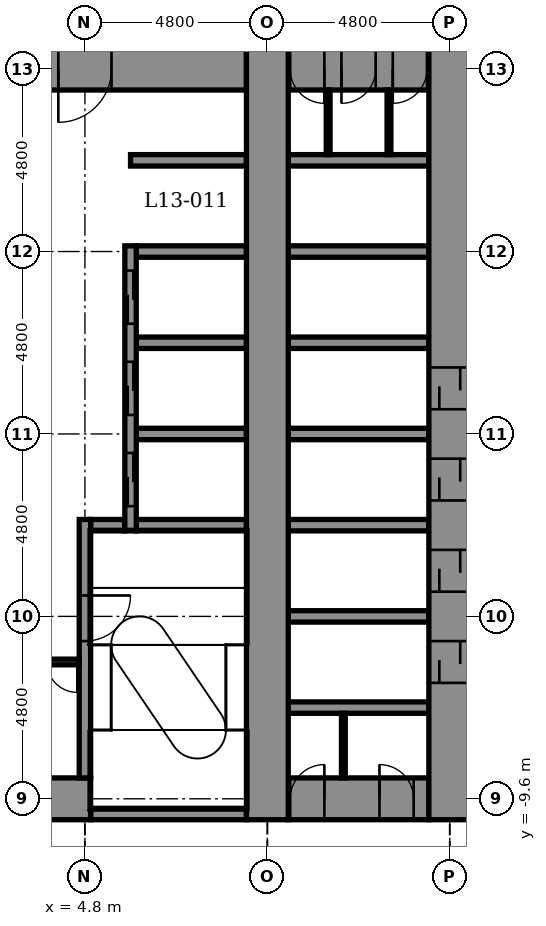
"""IFC4 building model, lengths in metres.
Left out: names, types, materials, properties, quantities, classifications, styles, units other than length and angle.
Written with IfcOpenShell. Run it as: python <this file> out.ifc"""

import sys

from ifc_helpers import new_model, si_unit, direction, frame, frame_2d, origin, place, context, subcontext, project, spatial, rectangle, extrude, element, fill, save


model = new_model("IFC4")
c1 = context("Model", 3, precision=1e-05, world=origin(), true_north=direction((0.0, 1.0)))
c2 = subcontext(c1, "Body", "Model", "MODEL_VIEW")
j1 = project(units=[si_unit("LENGTHUNIT", "METRE"), si_unit("PLANEANGLEUNIT", "RADIAN")], contexts=[c1])
p1 = place(None, origin())
s1 = spatial("IfcSite", under=j1, at=p1, CompositionType="ELEMENT")
p2 = place(p1, origin())
s2 = spatial("IfcBuilding", under=s1, at=p2, CompositionType="ELEMENT")
p3 = place(p2, frame((0.0, 0.0, 71.9)))
s3 = spatial("IfcBuildingStorey", under=s2, at=p3, CompositionType="ELEMENT", Elevation=71.9)
p4 = place(p3, frame((4.95, -10.0, -0.3), z_axis=(0.0, 0.0, 1.0), x_axis=(1.0, 0.0, 0.0)))
e1 = element("IfcWall", 1, at=p4, inside=s3, PredefinedType="STANDARD", context=c2, shape_type="SweptSolid", body=[
    extrude(rectangle(XDim=4.1, YDim=0.3, at=frame_2d((2.05, 0.0))), origin(), (0.0, 0.0, 1.0), 6.1),
])
p5 = place(p3, frame((-5.25, -9.6, -0.3), z_axis=(0.0, 0.0, 1.0), x_axis=(1.0, 0.0, 0.0)))
e2 = element("IfcWall", 2, at=p5, inside=s3, PredefinedType="SHEAR", context=c2, shape_type="SweptSolid", body=[
    extrude(rectangle(XDim=10.2, YDim=1.1, at=frame_2d((5.1, 0.0))), origin(), (0.0, 0.0, 1.0), 6.1),
])
p6 = place(p5, frame((0.6, 0.0, 0.3)))
e3 = element("IfcOpeningElement", 3, at=p6, cuts=e2, PredefinedType="OPENING", context=c2, shape_type="SweptSolid", body=[
    extrude(rectangle(XDim=0.9, YDim=2.1, at=frame_2d((0.45, 1.05))), frame((0.0, 0.56, 0.0), z_axis=(0.0, -1.0, 0.0), x_axis=(1.0, 0.0, 0.0)), (0.0, 0.0, 1.0), 1.12),
])
p7 = place(p3, frame((10.15, -9.6, -0.3), z_axis=(0.0, 0.0, 1.0), x_axis=(1.0, 0.0, 0.0)))
e4 = element("IfcWall", 4, at=p7, inside=s3, PredefinedType="SHEAR", context=c2, shape_type="SweptSolid", body=[
    extrude(rectangle(XDim=3.7, YDim=1.1, at=frame_2d((1.85, 0.0))), origin(), (0.0, 0.0, 1.0), 6.1),
])
p8 = place(p7, frame((0.05, 0.0, 0.3)))
e5 = element("IfcOpeningElement", 5, at=p8, cuts=e4, PredefinedType="OPENING", context=c2, shape_type="SweptSolid", body=[
    extrude(rectangle(XDim=0.9, YDim=2.1, at=frame_2d((0.45, 1.05))), frame((0.0, 0.56, 0.0), z_axis=(0.0, -1.0, 0.0), x_axis=(1.0, 0.0, 0.0)), (0.0, 0.0, 1.0), 1.12),
])
p9 = place(p7, frame((2.4, 0.0, 0.3)))
e6 = element("IfcOpeningElement", 6, at=p9, cuts=e4, PredefinedType="OPENING", context=c2, shape_type="SweptSolid", body=[
    extrude(rectangle(XDim=0.9, YDim=2.1, at=frame_2d((0.45, 1.05))), frame((0.0, 0.56, 0.0), z_axis=(0.0, -1.0, 0.0), x_axis=(1.0, 0.0, 0.0)), (0.0, 0.0, 1.0), 1.12),
])
for number, where, z_axis, x_axis in (
    (7, (10.15, -7.2, -0.3), (0.0, 0.0, 1.0), (1.0, 0.0, 0.0)),
    (8, (10.15, -4.8, -0.3), (0.0, 0.0, 1.0), (1.0, 0.0, 0.0)),
):
    element("IfcWall", number, at=place(p3, frame(where, z_axis=z_axis, x_axis=x_axis)), inside=s3, PredefinedType="STANDARD", context=c2, shape_type="SweptSolid", body=[
        extrude(rectangle(XDim=3.7, YDim=0.3, at=frame_2d((1.85, 0.0))), origin(), (0.0, 0.0, 1.0), 6.1),
    ])
p10 = place(p3, frame((4.95, -2.4, -0.3), z_axis=(0.0, 0.0, 1.0), x_axis=(1.0, 0.0, 0.0)))
e9 = element("IfcWall", 9, at=p10, inside=s3, PredefinedType="STANDARD", context=c2, shape_type="SweptSolid", body=[
    extrude(rectangle(XDim=0.9, YDim=0.3, at=frame_2d((0.45, 0.0))), origin(), (0.0, 0.0, 1.0), 6.1),
])
p11 = place(p3, frame((6.15, -2.4, -0.3), z_axis=(0.0, 0.0, 1.0), x_axis=(1.0, 0.0, 0.0)))
e10 = element("IfcWall", 10, at=p11, inside=s3, PredefinedType="STANDARD", context=c2, shape_type="SweptSolid", body=[
    extrude(rectangle(XDim=2.9, YDim=0.3, at=frame_2d((1.45, 0.0))), origin(), (0.0, 0.0, 1.0), 6.1),
])
p12 = place(p3, frame((10.15, -2.4, -0.3), z_axis=(0.0, 0.0, 1.0), x_axis=(1.0, 0.0, 0.0)))
e11 = element("IfcWall", 11, at=p12, inside=s3, PredefinedType="STANDARD", context=c2, shape_type="SweptSolid", body=[
    extrude(rectangle(XDim=3.7, YDim=0.3, at=frame_2d((1.85, 0.0))), origin(), (0.0, 0.0, 1.0), 6.1),
])
p13 = place(p3, frame((6.15, 0.0, -0.3), z_axis=(0.0, 0.0, 1.0), x_axis=(1.0, 0.0, 0.0)))
e12 = element("IfcWall", 12, at=p13, inside=s3, PredefinedType="STANDARD", context=c2, shape_type="SweptSolid", body=[
    extrude(rectangle(XDim=2.9, YDim=0.3, at=frame_2d((1.45, 0.0))), origin(), (0.0, 0.0, 1.0), 6.1),
])
p14 = place(p3, frame((10.15, 0.0, -0.3), z_axis=(0.0, 0.0, 1.0), x_axis=(1.0, 0.0, 0.0)))
e13 = element("IfcWall", 13, at=p14, inside=s3, PredefinedType="STANDARD", context=c2, shape_type="SweptSolid", body=[
    extrude(rectangle(XDim=3.7, YDim=0.3, at=frame_2d((1.85, 0.0))), origin(), (0.0, 0.0, 1.0), 6.1),
])
p15 = place(p3, frame((6.15, 2.4, -0.3), z_axis=(0.0, 0.0, 1.0), x_axis=(1.0, 0.0, 0.0)))
e14 = element("IfcWall", 14, at=p15, inside=s3, PredefinedType="STANDARD", context=c2, shape_type="SweptSolid", body=[
    extrude(rectangle(XDim=2.9, YDim=0.3, at=frame_2d((1.45, 0.0))), origin(), (0.0, 0.0, 1.0), 6.1),
])
p16 = place(p3, frame((10.15, 2.4, -0.3), z_axis=(0.0, 0.0, 1.0), x_axis=(1.0, 0.0, 0.0)))
e15 = element("IfcWall", 15, at=p16, inside=s3, PredefinedType="STANDARD", context=c2, shape_type="SweptSolid", body=[
    extrude(rectangle(XDim=3.7, YDim=0.3, at=frame_2d((1.85, 0.0))), origin(), (0.0, 0.0, 1.0), 6.1),
])
p17 = place(p3, frame((6.15, 4.8, -0.3), z_axis=(0.0, 0.0, 1.0), x_axis=(1.0, 0.0, 0.0)))
e16 = element("IfcWall", 16, at=p17, inside=s3, PredefinedType="STANDARD", context=c2, shape_type="SweptSolid", body=[
    extrude(rectangle(XDim=2.9, YDim=0.3, at=frame_2d((1.45, 0.0))), origin(), (0.0, 0.0, 1.0), 6.1),
])
p18 = place(p3, frame((10.15, 4.8, -0.3), z_axis=(0.0, 0.0, 1.0), x_axis=(1.0, 0.0, 0.0)))
e17 = element("IfcWall", 17, at=p18, inside=s3, PredefinedType="STANDARD", context=c2, shape_type="SweptSolid", body=[
    extrude(rectangle(XDim=3.7, YDim=0.3, at=frame_2d((1.85, 0.0))), origin(), (0.0, 0.0, 1.0), 6.1),
])
p19 = place(p3, frame((6.0, 7.2, -0.3), z_axis=(0.0, 0.0, 1.0), x_axis=(1.0, 0.0, 0.0)))
e18 = element("IfcWall", 18, at=p19, inside=s3, PredefinedType="STANDARD", context=c2, shape_type="SweptSolid", body=[
    extrude(rectangle(XDim=3.05, YDim=0.3, at=frame_2d((1.525, 0.0))), origin(), (0.0, 0.0, 1.0), 6.1),
])
p20 = place(p3, frame((10.15, 7.2, -0.3), z_axis=(0.0, 0.0, 1.0), x_axis=(1.0, 0.0, 0.0)))
e19 = element("IfcWall", 19, at=p20, inside=s3, PredefinedType="STANDARD", context=c2, shape_type="SweptSolid", body=[
    extrude(rectangle(XDim=3.7, YDim=0.3, at=frame_2d((1.85, 0.0))), origin(), (0.0, 0.0, 1.0), 6.1),
])
p21 = place(p3, frame((-5.25, 9.6, -0.3), z_axis=(0.0, 0.0, 1.0), x_axis=(1.0, 0.0, 0.0)))
e20 = element("IfcWall", 20, at=p21, inside=s3, PredefinedType="SHEAR", context=c2, shape_type="SweptSolid", body=[
    extrude(rectangle(XDim=14.3, YDim=1.1, at=frame_2d((7.15, 0.0))), origin(), (0.0, 0.0, 1.0), 6.1),
])
p22 = place(p21, frame((9.35, 0.0, 0.3)))
e21 = element("IfcOpeningElement", 21, at=p22, cuts=e20, PredefinedType="OPENING", context=c2, shape_type="SweptSolid", body=[
    extrude(rectangle(XDim=1.4, YDim=2.1, at=frame_2d((0.7, 1.05))), frame((0.0, 0.56, 0.0), z_axis=(0.0, -1.0, 0.0), x_axis=(1.0, 0.0, 0.0)), (0.0, 0.0, 1.0), 1.12),
])
p23 = place(p3, frame((10.15, 9.6, -0.3), z_axis=(0.0, 0.0, 1.0), x_axis=(1.0, 0.0, 0.0)))
e22 = element("IfcWall", 22, at=p23, inside=s3, PredefinedType="SHEAR", context=c2, shape_type="SweptSolid", body=[
    extrude(rectangle(XDim=3.7, YDim=1.1, at=frame_2d((1.85, 0.0))), origin(), (0.0, 0.0, 1.0), 6.1),
])
p24 = place(p23, frame((0.05, 0.0, 0.3)))
e23 = element("IfcOpeningElement", 23, at=p24, cuts=e22, PredefinedType="OPENING", context=c2, shape_type="SweptSolid", body=[
    extrude(rectangle(XDim=0.9, YDim=2.1, at=frame_2d((0.45, 1.05))), frame((0.0, 0.56, 0.0), z_axis=(0.0, -1.0, 0.0), x_axis=(1.0, 0.0, 0.0)), (0.0, 0.0, 1.0), 1.12),
])
p25 = place(p23, frame((1.4, 0.0, 0.3)))
e24 = element("IfcOpeningElement", 24, at=p25, cuts=e22, PredefinedType="OPENING", context=c2, shape_type="SweptSolid", body=[
    extrude(rectangle(XDim=0.9, YDim=2.1, at=frame_2d((0.45, 1.05))), frame((0.0, 0.56, 0.0), z_axis=(0.0, -1.0, 0.0), x_axis=(1.0, 0.0, 0.0)), (0.0, 0.0, 1.0), 1.12),
])
p26 = place(p23, frame((2.75, 0.0, 0.3)))
e25 = element("IfcOpeningElement", 25, at=p26, cuts=e22, PredefinedType="OPENING", context=c2, shape_type="SweptSolid", body=[
    extrude(rectangle(XDim=0.9, YDim=2.1, at=frame_2d((0.45, 1.05))), frame((0.0, 0.56, 0.0), z_axis=(0.0, -1.0, 0.0), x_axis=(1.0, 0.0, 0.0)), (0.0, 0.0, 1.0), 1.12),
])
p27 = place(p3, frame((4.8, -9.05, -0.3), z_axis=(0.0, 0.0, 1.0), x_axis=(0.0, 1.0, 0.0)))
e26 = element("IfcWall", 26, at=p27, inside=s3, PredefinedType="STANDARD", context=c2, shape_type="SweptSolid", body=[
    extrude(rectangle(XDim=6.8, YDim=0.3, at=frame_2d((3.4, 0.0))), origin(), (0.0, 0.0, 1.0), 6.1),
])
p28 = place(p27, frame((3.6, 0.0, 0.3)))
e27 = element("IfcOpeningElement", 27, at=p28, cuts=e26, PredefinedType="OPENING", context=c2, shape_type="SweptSolid", body=[
    extrude(rectangle(XDim=1.2, YDim=2.1, at=frame_2d((0.6, 1.05))), frame((0.0, 0.16, 0.0), z_axis=(0.0, -1.0, 0.0), x_axis=(1.0, 0.0, 0.0)), (0.0, 0.0, 1.0), 0.32),
])
p29 = place(p3, frame((6.0, -2.55, -0.3), z_axis=(0.0, 0.0, 1.0), x_axis=(0.0, 1.0, 0.0)))
e28 = element("IfcWall", 28, at=p29, inside=s3, PredefinedType="STANDARD", context=c2, shape_type="SweptSolid", body=[
    extrude(rectangle(XDim=7.5, YDim=0.3, at=frame_2d((3.75, 0.0))), origin(), (0.0, 0.0, 1.0), 6.1),
])
p30 = place(p29, frame((0.65, 0.0, 0.3)))
e29 = element("IfcOpeningElement", 29, at=p30, cuts=e28, PredefinedType="OPENING", context=c2, shape_type="SweptSolid", body=[
    extrude(rectangle(XDim=1.4, YDim=2.1, at=frame_2d((0.7, 1.05))), frame((0.0, 0.16, 0.0), z_axis=(0.0, -1.0, 0.0), x_axis=(1.0, 0.0, 0.0)), (0.0, 0.0, 1.0), 0.32),
])
p31 = place(p29, frame((3.05, 0.0, 0.3)))
e30 = element("IfcOpeningElement", 30, at=p31, cuts=e28, PredefinedType="OPENING", context=c2, shape_type="SweptSolid", body=[
    extrude(rectangle(XDim=1.4, YDim=2.1, at=frame_2d((0.7, 1.05))), frame((0.0, 0.16, 0.0), z_axis=(0.0, -1.0, 0.0), x_axis=(1.0, 0.0, 0.0)), (0.0, 0.0, 1.0), 0.32),
])
p32 = place(p29, frame((5.45, 0.0, 0.3)))
e31 = element("IfcOpeningElement", 31, at=p32, cuts=e28, PredefinedType="OPENING", context=c2, shape_type="SweptSolid", body=[
    extrude(rectangle(XDim=1.4, YDim=2.1, at=frame_2d((0.7, 1.05))), frame((0.0, 0.16, 0.0), z_axis=(0.0, -1.0, 0.0), x_axis=(1.0, 0.0, 0.0)), (0.0, 0.0, 1.0), 0.32),
])
p33 = place(p3, frame((9.6, -10.15, -0.3), z_axis=(0.0, 0.0, 1.0), x_axis=(0.0, 1.0, 0.0)))
e32 = element("IfcWall", 32, at=p33, inside=s3, PredefinedType="SHEAR", context=c2, shape_type="SweptSolid", body=[
    extrude(rectangle(XDim=20.3, YDim=1.1, at=frame_2d((10.15, 0.0))), origin(), (0.0, 0.0, 1.0), 6.1),
])
p34 = place(p3, frame((14.4, -10.15, -0.3), z_axis=(0.0, 0.0, 1.0), x_axis=(0.0, 1.0, 0.0)))
e33 = element("IfcWall", 33, at=p34, inside=s3, PredefinedType="SHEAR", context=c2, shape_type="SweptSolid", body=[
    extrude(rectangle(XDim=20.3, YDim=1.1, at=frame_2d((10.15, 0.0))), origin(), (0.0, 0.0, 1.0), 6.1),
])
p35 = place(p34, frame((3.6, 0.0, 0.3)))
e34 = element("IfcOpeningElement", 34, at=p35, cuts=e33, PredefinedType="OPENING", context=c2, shape_type="SweptSolid", body=[
    extrude(rectangle(XDim=1.1, YDim=2.1, at=frame_2d((0.55, 1.05))), frame((0.0, 0.56, 0.0), z_axis=(0.0, -1.0, 0.0), x_axis=(1.0, 0.0, 0.0)), (0.0, 0.0, 1.0), 1.12),
])
p36 = place(p34, frame((6.0, 0.0, 0.3)))
e35 = element("IfcOpeningElement", 35, at=p36, cuts=e33, PredefinedType="OPENING", context=c2, shape_type="SweptSolid", body=[
    extrude(rectangle(XDim=1.1, YDim=2.1, at=frame_2d((0.55, 1.05))), frame((0.0, 0.56, 0.0), z_axis=(0.0, -1.0, 0.0), x_axis=(1.0, 0.0, 0.0)), (0.0, 0.0, 1.0), 1.12),
])
p37 = place(p34, frame((8.4, 0.0, 0.3)))
e36 = element("IfcOpeningElement", 36, at=p37, cuts=e33, PredefinedType="OPENING", context=c2, shape_type="SweptSolid", body=[
    extrude(rectangle(XDim=1.1, YDim=2.1, at=frame_2d((0.55, 1.05))), frame((0.0, 0.56, 0.0), z_axis=(0.0, -1.0, 0.0), x_axis=(1.0, 0.0, 0.0)), (0.0, 0.0, 1.0), 1.12),
])
p38 = place(p34, frame((10.8, 0.0, 0.3)))
e37 = element("IfcOpeningElement", 37, at=p38, cuts=e33, PredefinedType="OPENING", context=c2, shape_type="SweptSolid", body=[
    extrude(rectangle(XDim=1.1, YDim=2.1, at=frame_2d((0.55, 1.05))), frame((0.0, 0.56, 0.0), z_axis=(0.0, -1.0, 0.0), x_axis=(1.0, 0.0, 0.0)), (0.0, 0.0, 1.0), 1.12),
])
for number, where, z_axis, x_axis in (
    (38, (12.8, 7.35, 0.0), (0.0, 0.0, 1.0), (0.0, 1.0, 0.0)),
    (39, (11.6, -9.05, 0.0), (0.0, 0.0, 1.0), (0.0, 1.0, 0.0)),
    (40, (11.2, 7.35, 0.0), (0.0, 0.0, 1.0), (0.0, 1.0, 0.0)),
):
    element("IfcWall", number, at=place(p3, frame(where, z_axis=z_axis, x_axis=x_axis)), inside=s3, PredefinedType="PARTITIONING", context=c2, shape_type="SweptSolid", body=[
        extrude(rectangle(XDim=1.7, YDim=0.1, at=frame_2d((0.85, 0.0))), origin(), (0.0, 0.0, 1.0), 5.8),
    ])
p39 = place(p3, frame((3.75, -6.0, 0.0), z_axis=(0.0, 0.0, 1.0), x_axis=(1.0, 0.0, 0.0)))
e41 = element("IfcWall", 41, at=p39, inside=s3, PredefinedType="PARTITIONING", context=c2, shape_type="SweptSolid", body=[
    extrude(rectangle(XDim=0.9, YDim=0.15, at=frame_2d((0.45, 0.0))), origin(), (0.0, 0.0, 1.0), 5.8),
])
p40 = place(p39, frame((0.05, 0.0, 0.0)))
e42 = element("IfcOpeningElement", 42, at=p40, cuts=e41, PredefinedType="OPENING", context=c2, shape_type="SweptSolid", body=[
    extrude(rectangle(XDim=0.8, YDim=2.1, at=frame_2d((0.4, 1.05))), frame((0.0, 0.085, 0.0), z_axis=(0.0, -1.0, 0.0), x_axis=(1.0, 0.0, 0.0)), (0.0, 0.0, 1.0), 0.17),
])
p41 = place(p40, frame((0.8, 0.0, 0.0), z_axis=(0.0, 0.0, 1.0), x_axis=(-1.0, 0.0, 0.0)))
e43 = element("IfcDoor", 43, at=p41, inside=s3, OperationType="SINGLE_SWING_RIGHT", PredefinedType="DOOR", context=c2, shape_type="SweptSolid", body=[
    extrude(rectangle(XDim=0.8, YDim=2.1, at=frame_2d((0.4, 1.05))), frame((0.0, 0.025, 0.0), z_axis=(0.0, -1.0, 0.0), x_axis=(1.0, 0.0, 0.0)), (0.0, 0.0, 1.0), 0.05),
])
fill(e42, e43)
p42 = place(p30, origin())
e44 = element("IfcDoor", 44, at=p42, inside=s3, OperationType="DOUBLE_DOOR_SLIDING", PredefinedType="DOOR", context=c2, shape_type="SweptSolid", body=[
    extrude(rectangle(XDim=1.4, YDim=2.1, at=frame_2d((0.7, 1.05))), frame((0.0, 0.025, 0.0), z_axis=(0.0, -1.0, 0.0), x_axis=(1.0, 0.0, 0.0)), (0.0, 0.0, 1.0), 0.05),
])
fill(e29, e44)
p43 = place(p31, origin())
e45 = element("IfcDoor", 45, at=p43, inside=s3, OperationType="DOUBLE_DOOR_SLIDING", PredefinedType="DOOR", context=c2, shape_type="SweptSolid", body=[
    extrude(rectangle(XDim=1.4, YDim=2.1, at=frame_2d((0.7, 1.05))), frame((0.0, 0.025, 0.0), z_axis=(0.0, -1.0, 0.0), x_axis=(1.0, 0.0, 0.0)), (0.0, 0.0, 1.0), 0.05),
])
fill(e30, e45)
p44 = place(p32, origin())
e46 = element("IfcDoor", 46, at=p44, inside=s3, OperationType="DOUBLE_DOOR_SLIDING", PredefinedType="DOOR", context=c2, shape_type="SweptSolid", body=[
    extrude(rectangle(XDim=1.4, YDim=2.1, at=frame_2d((0.7, 1.05))), frame((0.0, 0.025, 0.0), z_axis=(0.0, -1.0, 0.0), x_axis=(1.0, 0.0, 0.0)), (0.0, 0.0, 1.0), 0.05),
])
fill(e31, e46)
p45 = place(p35, origin())
e47 = element("IfcDoor", 47, at=p45, inside=s3, OperationType="DOUBLE_DOOR_SLIDING", PredefinedType="DOOR", context=c2, shape_type="SweptSolid", body=[
    extrude(rectangle(XDim=1.1, YDim=2.1, at=frame_2d((0.55, 1.05))), frame((0.0, 0.025, 0.0), z_axis=(0.0, -1.0, 0.0), x_axis=(1.0, 0.0, 0.0)), (0.0, 0.0, 1.0), 0.05),
])
fill(e34, e47)
p46 = place(p36, origin())
e48 = element("IfcDoor", 48, at=p46, inside=s3, OperationType="DOUBLE_DOOR_SLIDING", PredefinedType="DOOR", context=c2, shape_type="SweptSolid", body=[
    extrude(rectangle(XDim=1.1, YDim=2.1, at=frame_2d((0.55, 1.05))), frame((0.0, 0.025, 0.0), z_axis=(0.0, -1.0, 0.0), x_axis=(1.0, 0.0, 0.0)), (0.0, 0.0, 1.0), 0.05),
])
fill(e35, e48)
p47 = place(p37, origin())
e49 = element("IfcDoor", 49, at=p47, inside=s3, OperationType="DOUBLE_DOOR_SLIDING", PredefinedType="DOOR", context=c2, shape_type="SweptSolid", body=[
    extrude(rectangle(XDim=1.1, YDim=2.1, at=frame_2d((0.55, 1.05))), frame((0.0, 0.025, 0.0), z_axis=(0.0, -1.0, 0.0), x_axis=(1.0, 0.0, 0.0)), (0.0, 0.0, 1.0), 0.05),
])
fill(e36, e49)
p48 = place(p38, origin())
e50 = element("IfcDoor", 50, at=p48, inside=s3, OperationType="DOUBLE_DOOR_SLIDING", PredefinedType="DOOR", context=c2, shape_type="SweptSolid", body=[
    extrude(rectangle(XDim=1.1, YDim=2.1, at=frame_2d((0.55, 1.05))), frame((0.0, 0.025, 0.0), z_axis=(0.0, -1.0, 0.0), x_axis=(1.0, 0.0, 0.0)), (0.0, 0.0, 1.0), 0.05),
])
fill(e37, e50)
p49 = place(p28, frame((1.2, 0.0, 0.0), z_axis=(0.0, 0.0, 1.0), x_axis=(-1.0, 0.0, 0.0)))
e51 = element("IfcDoor", 51, at=p49, inside=s3, OperationType="SINGLE_SWING_RIGHT", PredefinedType="DOOR", context=c2, shape_type="SweptSolid", body=[
    extrude(rectangle(XDim=1.2, YDim=2.1, at=frame_2d((0.6, 1.05))), frame((0.0, 0.025, 0.0), z_axis=(0.0, -1.0, 0.0), x_axis=(1.0, 0.0, 0.0)), (0.0, 0.0, 1.0), 0.05),
])
fill(e27, e51)
p50 = place(p8, origin())
e52 = element("IfcDoor", 52, at=p50, inside=s3, OperationType="SINGLE_SWING_RIGHT", PredefinedType="DOOR", context=c2, shape_type="SweptSolid", body=[
    extrude(rectangle(XDim=0.9, YDim=2.1, at=frame_2d((0.45, 1.05))), frame((0.0, 0.025, 0.0), z_axis=(0.0, -1.0, 0.0), x_axis=(1.0, 0.0, 0.0)), (0.0, 0.0, 1.0), 0.05),
])
fill(e5, e52)
p51 = place(p9, origin())
e53 = element("IfcDoor", 53, at=p51, inside=s3, OperationType="SINGLE_SWING_LEFT", PredefinedType="DOOR", context=c2, shape_type="SweptSolid", body=[
    extrude(rectangle(XDim=0.9, YDim=2.1, at=frame_2d((0.45, 1.05))), frame((0.0, 0.025, 0.0), z_axis=(0.0, -1.0, 0.0), x_axis=(1.0, 0.0, 0.0)), (0.0, 0.0, 1.0), 0.05),
])
fill(e6, e53)
p52 = place(p24, frame((0.9, 0.0, 0.0), z_axis=(0.0, 0.0, 1.0), x_axis=(-1.0, 0.0, 0.0)))
e54 = element("IfcDoor", 54, at=p52, inside=s3, OperationType="SINGLE_SWING_RIGHT", PredefinedType="DOOR", context=c2, shape_type="SweptSolid", body=[
    extrude(rectangle(XDim=0.9, YDim=2.1, at=frame_2d((0.45, 1.05))), frame((0.0, 0.025, 0.0), z_axis=(0.0, -1.0, 0.0), x_axis=(1.0, 0.0, 0.0)), (0.0, 0.0, 1.0), 0.05),
])
fill(e23, e54)
p53 = place(p25, frame((0.9, 0.0, 0.0), z_axis=(0.0, 0.0, 1.0), x_axis=(-1.0, 0.0, 0.0)))
e55 = element("IfcDoor", 55, at=p53, inside=s3, OperationType="SINGLE_SWING_LEFT", PredefinedType="DOOR", context=c2, shape_type="SweptSolid", body=[
    extrude(rectangle(XDim=0.9, YDim=2.1, at=frame_2d((0.45, 1.05))), frame((0.0, 0.025, 0.0), z_axis=(0.0, -1.0, 0.0), x_axis=(1.0, 0.0, 0.0)), (0.0, 0.0, 1.0), 0.05),
])
fill(e24, e55)
p54 = place(p26, frame((0.9, 0.0, 0.0), z_axis=(0.0, 0.0, 1.0), x_axis=(-1.0, 0.0, 0.0)))
e56 = element("IfcDoor", 56, at=p54, inside=s3, OperationType="SINGLE_SWING_LEFT", PredefinedType="DOOR", context=c2, shape_type="SweptSolid", body=[
    extrude(rectangle(XDim=0.9, YDim=2.1, at=frame_2d((0.45, 1.05))), frame((0.0, 0.025, 0.0), z_axis=(0.0, -1.0, 0.0), x_axis=(1.0, 0.0, 0.0)), (0.0, 0.0, 1.0), 0.05),
])
fill(e25, e56)
p55 = place(p22, frame((1.4, 0.0, 0.0), z_axis=(0.0, 0.0, 1.0), x_axis=(-1.0, 0.0, 0.0)))
e57 = element("IfcDoor", 57, at=p55, inside=s3, OperationType="SINGLE_SWING_LEFT", PredefinedType="DOOR", context=c2, shape_type="SweptSolid", body=[
    extrude(rectangle(XDim=1.4, YDim=2.1, at=frame_2d((0.7, 1.05))), frame((0.0, 0.025, 0.0), z_axis=(0.0, -1.0, 0.0), x_axis=(1.0, 0.0, 0.0)), (0.0, 0.0, 1.0), 0.05),
])
fill(e21, e57)
save(model, sys.argv[1])
